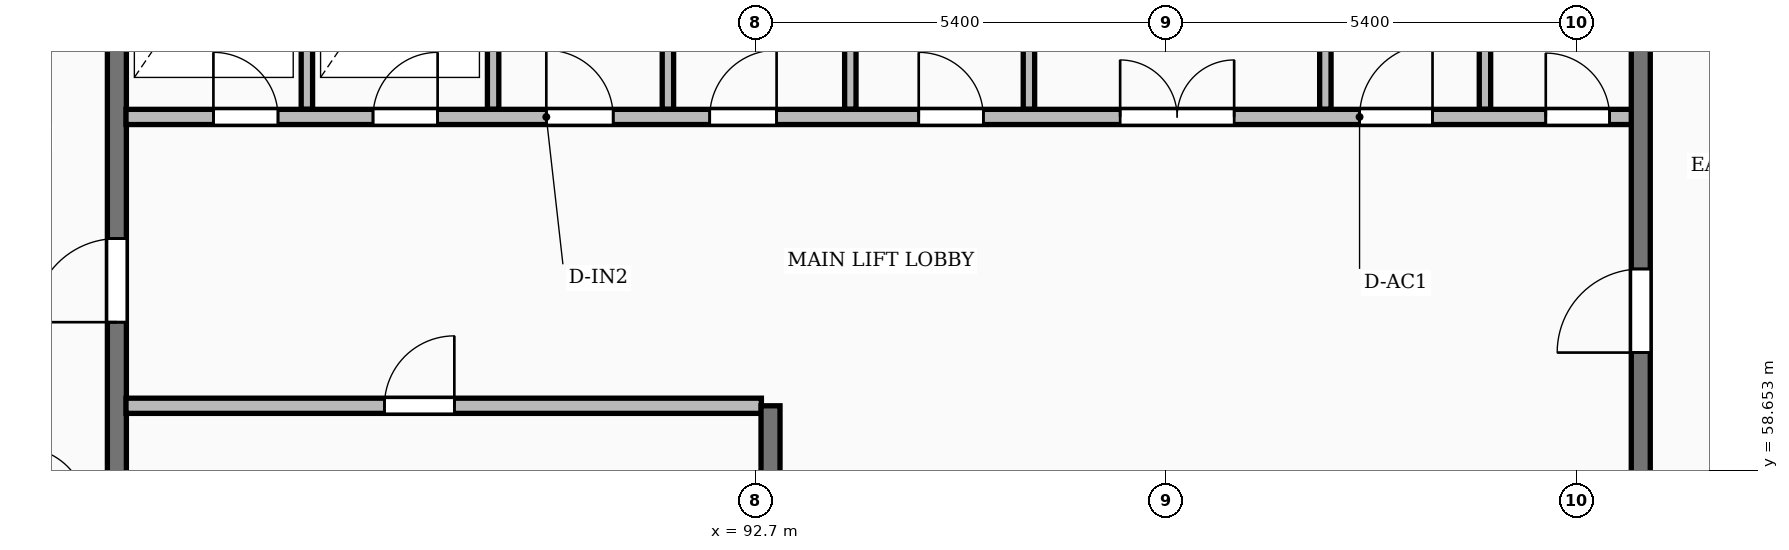
"""IFC4 building model, lengths in metres.
Left out: names, types, materials, properties, quantities, classifications, styles, units other than length and angle.
Written with IfcOpenShell. Run it as: python <this file> out.ifc"""

import sys

from ifc_helpers import new_model, si_unit, direction, frame, frame_2d, origin, place, context, subcontext, project, spatial, rectangle, extrude, element, fill, save


model = new_model("IFC4")
c1 = context("Model", 3, precision=1e-05, world=origin(), true_north=direction((0.0, 1.0)))
c2 = subcontext(c1, "Body", "Model", "MODEL_VIEW")
j1 = project(units=[si_unit("LENGTHUNIT", "METRE"), si_unit("PLANEANGLEUNIT", "RADIAN")], contexts=[c1])
p1 = place(None, origin())
s1 = spatial("IfcSite", under=j1, at=p1, CompositionType="ELEMENT")
p2 = place(p1, origin())
s2 = spatial("IfcBuilding", under=s1, at=p2, CompositionType="ELEMENT")
p3 = place(p2, frame((0.0, 0.0, 162.1)))
s3 = spatial("IfcBuildingStorey", under=s2, at=p3, CompositionType="ELEMENT", Elevation=162.1)
p4 = place(p3, frame((84.3, 55.4, 0.0), z_axis=(0.0, 0.0, 1.0), x_axis=(0.0, 1.0, 0.0)))
e1 = element("IfcWall", 1, at=p4, inside=s3, PredefinedType="SHEAR", context=c2, shape_type="SweptSolid", body=[
    extrude(rectangle(XDim=11.6, YDim=0.25, at=frame_2d((5.8, 0.0))), origin(), (0.0, 0.0, 1.0), 3.25),
])
p5 = place(p4, frame((5.2, 0.0, 0.0)))
e2 = element("IfcOpeningElement", 2, at=p5, cuts=e1, PredefinedType="OPENING", context=c2, shape_type="SweptSolid", body=[
    extrude(rectangle(XDim=1.1, YDim=2.1, at=frame_2d((0.55, 1.05))), frame((0.0, 0.135, 0.0), z_axis=(0.0, -1.0, 0.0), x_axis=(1.0, 0.0, 0.0)), (0.0, 0.0, 1.0), 0.27),
])
p6 = place(p3, frame((84.42, 59.5, 0.0), z_axis=(0.0, 0.0, 1.0), x_axis=(1.0, 0.0, 0.0)))
e3 = element("IfcWall", 3, at=p6, inside=s3, PredefinedType="PARTITIONING", context=c2, shape_type="SweptSolid", body=[
    extrude(rectangle(XDim=8.36, YDim=0.2, at=frame_2d((4.18, 0.0))), origin(), (0.0, 0.0, 1.0), 2.97),
])
p7 = place(p6, frame((3.4, 0.0, 0.0)))
e4 = element("IfcOpeningElement", 4, at=p7, cuts=e3, PredefinedType="OPENING", context=c2, shape_type="SweptSolid", body=[
    extrude(rectangle(XDim=0.92, YDim=2.08, at=frame_2d((0.46, 1.04))), frame((0.0, 0.11, 0.0), z_axis=(0.0, -1.0, 0.0), x_axis=(1.0, 0.0, 0.0)), (0.0, 0.0, 1.0), 0.22),
])
p8 = place(p3, frame((92.9, 55.4, 0.0), z_axis=(0.0, 0.0, 1.0), x_axis=(0.0, 1.0, 0.0)))
e5 = element("IfcWall", 5, at=p8, inside=s3, PredefinedType="SHEAR", context=c2, shape_type="SweptSolid", body=[
    extrude(rectangle(XDim=4.1, YDim=0.25, at=frame_2d((2.05, 0.0))), origin(), (0.0, 0.0, 1.0), 3.25),
])
for number, where, z_axis, x_axis in (
    (6, (86.8, 63.4, 0.0), (0.0, 0.0, 1.0), (0.0, 1.0, 0.0)),
    (7, (89.25, 63.4, 0.0), (0.0, 0.0, 1.0), (0.0, 1.0, 0.0)),
    (8, (91.55, 63.4, 0.0), (0.0, 0.0, 1.0), (0.0, 1.0, 0.0)),
):
    element("IfcWall", number, at=place(p3, frame(where, z_axis=z_axis, x_axis=x_axis)), inside=s3, PredefinedType="PARTITIONING", context=c2, shape_type="SweptSolid", body=[
        extrude(rectangle(XDim=3.6, YDim=0.15, at=frame_2d((1.8, 0.0))), origin(), (0.0, 0.0, 1.0), 2.97),
    ])
p9 = place(p3, frame((93.95, 63.4, 0.0), z_axis=(0.0, 0.0, 1.0), x_axis=(0.0, 1.0, 0.0)))
e9 = element("IfcWall", 9, at=p9, inside=s3, PredefinedType="PARTITIONING", context=c2, shape_type="SweptSolid", body=[
    extrude(rectangle(XDim=3.6, YDim=0.15, at=frame_2d((1.8, 0.0))), origin(), (0.0, 0.0, 1.0), 2.277),
])
for number, where, z_axis, x_axis in (
    (10, (102.3, 63.4, 0.0), (0.0, 0.0, 1.0), (0.0, 1.0, 0.0)),
    (11, (96.3, 63.4, 0.0), (0.0, 0.0, 1.0), (0.0, 1.0, 0.0)),
    (12, (100.2, 63.4, 0.0), (0.0, 0.0, 1.0), (0.0, 1.0, 0.0)),
):
    element("IfcWall", number, at=place(p3, frame(where, z_axis=z_axis, x_axis=x_axis)), inside=s3, PredefinedType="PARTITIONING", context=c2, shape_type="SweptSolid", body=[
        extrude(rectangle(XDim=3.6, YDim=0.15, at=frame_2d((1.8, 0.0))), origin(), (0.0, 0.0, 1.0), 2.97),
    ])
p10 = place(p3, frame((84.42, 63.3, 0.0), z_axis=(0.0, 0.0, 1.0), x_axis=(1.0, 0.0, 0.0)))
e13 = element("IfcWall", 13, at=p10, inside=s3, PredefinedType="PARTITIONING", context=c2, shape_type="SweptSolid", body=[
    extrude(rectangle(XDim=19.83, YDim=0.2, at=frame_2d((9.915, 0.0))), origin(), (0.0, 0.0, 1.0), 2.97),
])
p11 = place(p10, frame((1.15, 0.0, 0.0)))
e14 = element("IfcOpeningElement", 14, at=p11, cuts=e13, PredefinedType="OPENING", context=c2, shape_type="SweptSolid", body=[
    extrude(rectangle(XDim=0.85, YDim=2.05, at=frame_2d((0.425, 1.025))), frame((0.0, 0.11, 0.0), z_axis=(0.0, -1.0, 0.0), x_axis=(1.0, 0.0, 0.0)), (0.0, 0.0, 1.0), 0.22),
])
p12 = place(p10, frame((3.25, 0.0, 0.0)))
e15 = element("IfcOpeningElement", 15, at=p12, cuts=e13, PredefinedType="OPENING", context=c2, shape_type="SweptSolid", body=[
    extrude(rectangle(XDim=0.85, YDim=2.05, at=frame_2d((0.425, 1.025))), frame((0.0, 0.11, 0.0), z_axis=(0.0, -1.0, 0.0), x_axis=(1.0, 0.0, 0.0)), (0.0, 0.0, 1.0), 0.22),
])
p13 = place(p10, frame((13.08, 0.0, 0.0)))
e16 = element("IfcOpeningElement", 16, at=p13, cuts=e13, PredefinedType="OPENING", context=c2, shape_type="SweptSolid", body=[
    extrude(rectangle(XDim=1.5, YDim=2.2, at=frame_2d((0.75, 1.1))), frame((0.0, 0.11, 0.0), z_axis=(0.0, -1.0, 0.0), x_axis=(1.0, 0.0, 0.0)), (0.0, 0.0, 1.0), 0.22),
])
p14 = place(p10, frame((5.53, 0.0, 0.0)))
e17 = element("IfcOpeningElement", 17, at=p14, cuts=e13, PredefinedType="OPENING", context=c2, shape_type="SweptSolid", body=[
    extrude(rectangle(XDim=0.88, YDim=2.06, at=frame_2d((0.44, 1.03))), frame((0.0, 0.11, 0.0), z_axis=(0.0, -1.0, 0.0), x_axis=(1.0, 0.0, 0.0)), (0.0, 0.0, 1.0), 0.22),
])
p15 = place(p10, frame((7.68, 0.0, 0.0)))
e18 = element("IfcOpeningElement", 18, at=p15, cuts=e13, PredefinedType="OPENING", context=c2, shape_type="SweptSolid", body=[
    extrude(rectangle(XDim=0.88, YDim=2.06, at=frame_2d((0.44, 1.03))), frame((0.0, 0.11, 0.0), z_axis=(0.0, -1.0, 0.0), x_axis=(1.0, 0.0, 0.0)), (0.0, 0.0, 1.0), 0.22),
])
p16 = place(p10, frame((10.43, 0.0, 0.0)))
e19 = element("IfcOpeningElement", 19, at=p16, cuts=e13, PredefinedType="OPENING", context=c2, shape_type="SweptSolid", body=[
    extrude(rectangle(XDim=0.85, YDim=2.05, at=frame_2d((0.425, 1.025))), frame((0.0, 0.11, 0.0), z_axis=(0.0, -1.0, 0.0), x_axis=(1.0, 0.0, 0.0)), (0.0, 0.0, 1.0), 0.22),
])
p17 = place(p10, frame((16.23, 0.0, 0.0)))
e20 = element("IfcOpeningElement", 20, at=p17, cuts=e13, PredefinedType="OPENING", context=c2, shape_type="SweptSolid", body=[
    extrude(rectangle(XDim=0.96, YDim=2.1, at=frame_2d((0.48, 1.05))), frame((0.0, 0.11, 0.0), z_axis=(0.0, -1.0, 0.0), x_axis=(1.0, 0.0, 0.0)), (0.0, 0.0, 1.0), 0.22),
])
p18 = place(p10, frame((18.68, 0.0, 0.0)))
e21 = element("IfcOpeningElement", 21, at=p18, cuts=e13, PredefinedType="OPENING", context=c2, shape_type="SweptSolid", body=[
    extrude(rectangle(XDim=0.84, YDim=2.04, at=frame_2d((0.42, 1.02))), frame((0.0, 0.11, 0.0), z_axis=(0.0, -1.0, 0.0), x_axis=(1.0, 0.0, 0.0)), (0.0, 0.0, 1.0), 0.22),
])
p19 = place(p3, frame((104.35, 58.4, 0.0), z_axis=(0.0, 0.0, 1.0), x_axis=(0.0, 1.0, 0.0)))
e22 = element("IfcWall", 22, at=p19, inside=s3, PredefinedType="SHEAR", context=c2, shape_type="SweptSolid", body=[
    extrude(rectangle(XDim=8.6, YDim=0.25, at=frame_2d((4.3, 0.0))), origin(), (0.0, 0.0, 1.0), 3.25),
])
p20 = place(p19, frame((1.8, 0.0, 0.0)))
e23 = element("IfcOpeningElement", 23, at=p20, cuts=e22, PredefinedType="OPENING", context=c2, shape_type="SweptSolid", body=[
    extrude(rectangle(XDim=1.1, YDim=2.1, at=frame_2d((0.55, 1.05))), frame((0.0, 0.135, 0.0), z_axis=(0.0, -1.0, 0.0), x_axis=(1.0, 0.0, 0.0)), (0.0, 0.0, 1.0), 0.27),
])
p21 = place(p5, origin())
e24 = element("IfcDoor", 24, at=p21, inside=s3, OperationType="SINGLE_SWING_LEFT", PredefinedType="DOOR", context=c2, shape_type="SweptSolid", body=[
    extrude(rectangle(XDim=1.1, YDim=2.1, at=frame_2d((0.55, 1.05))), frame((0.0, 0.025, 0.0), z_axis=(0.0, -1.0, 0.0), x_axis=(1.0, 0.0, 0.0)), (0.0, 0.0, 1.0), 0.05),
])
fill(e2, e24)
p22 = place(p7, origin())
e25 = element("IfcDoor", 25, at=p22, inside=s3, OperationType="SINGLE_SWING_RIGHT", PredefinedType="DOOR", context=c2, shape_type="SweptSolid", body=[
    extrude(rectangle(XDim=0.92, YDim=2.08, at=frame_2d((0.46, 1.04))), frame((0.0, 0.025, 0.0), z_axis=(0.0, -1.0, 0.0), x_axis=(1.0, 0.0, 0.0)), (0.0, 0.0, 1.0), 0.05),
])
fill(e4, e25)
p23 = place(p11, origin())
e26 = element("IfcDoor", 26, at=p23, inside=s3, OperationType="SINGLE_SWING_LEFT", PredefinedType="DOOR", context=c2, shape_type="SweptSolid", body=[
    extrude(rectangle(XDim=0.85, YDim=2.05, at=frame_2d((0.425, 1.025))), frame((0.0, 0.025, 0.0), z_axis=(0.0, -1.0, 0.0), x_axis=(1.0, 0.0, 0.0)), (0.0, 0.0, 1.0), 0.05),
])
fill(e14, e26)
p24 = place(p12, origin())
e27 = element("IfcDoor", 27, at=p24, inside=s3, OperationType="SINGLE_SWING_RIGHT", PredefinedType="DOOR", context=c2, shape_type="SweptSolid", body=[
    extrude(rectangle(XDim=0.85, YDim=2.05, at=frame_2d((0.425, 1.025))), frame((0.0, 0.025, 0.0), z_axis=(0.0, -1.0, 0.0), x_axis=(1.0, 0.0, 0.0)), (0.0, 0.0, 1.0), 0.05),
])
fill(e15, e27)
p25 = place(p13, origin())
e28 = element("IfcDoor", 28, at=p25, inside=s3, OperationType="DOUBLE_DOOR_SINGLE_SWING", PredefinedType="DOOR", context=c2, shape_type="SweptSolid", body=[
    extrude(rectangle(XDim=1.5, YDim=2.2, at=frame_2d((0.75, 1.1))), frame((0.0, 0.025, 0.0), z_axis=(0.0, -1.0, 0.0), x_axis=(1.0, 0.0, 0.0)), (0.0, 0.0, 1.0), 0.05),
])
fill(e16, e28)
p26 = place(p14, origin())
e29 = element("IfcDoor", 29, at=p26, inside=s3, OperationType="SINGLE_SWING_LEFT", PredefinedType="DOOR", context=c2, shape_type="SweptSolid", body=[
    extrude(rectangle(XDim=0.88, YDim=2.06, at=frame_2d((0.44, 1.03))), frame((0.0, 0.025, 0.0), z_axis=(0.0, -1.0, 0.0), x_axis=(1.0, 0.0, 0.0)), (0.0, 0.0, 1.0), 0.05),
])
fill(e17, e29)
p27 = place(p15, origin())
e30 = element("IfcDoor", 30, at=p27, inside=s3, OperationType="SINGLE_SWING_RIGHT", PredefinedType="DOOR", context=c2, shape_type="SweptSolid", body=[
    extrude(rectangle(XDim=0.88, YDim=2.06, at=frame_2d((0.44, 1.03))), frame((0.0, 0.025, 0.0), z_axis=(0.0, -1.0, 0.0), x_axis=(1.0, 0.0, 0.0)), (0.0, 0.0, 1.0), 0.05),
])
fill(e18, e30)
p28 = place(p16, origin())
e31 = element("IfcDoor", 31, at=p28, inside=s3, OperationType="SINGLE_SWING_LEFT", PredefinedType="DOOR", context=c2, shape_type="SweptSolid", body=[
    extrude(rectangle(XDim=0.85, YDim=2.05, at=frame_2d((0.425, 1.025))), frame((0.0, 0.025, 0.0), z_axis=(0.0, -1.0, 0.0), x_axis=(1.0, 0.0, 0.0)), (0.0, 0.0, 1.0), 0.05),
])
fill(e19, e31)
p29 = place(p17, origin())
e32 = element("IfcDoor", 32, at=p29, inside=s3, OperationType="SINGLE_SWING_RIGHT", PredefinedType="DOOR", context=c2, shape_type="SweptSolid", body=[
    extrude(rectangle(XDim=0.96, YDim=2.1, at=frame_2d((0.48, 1.05))), frame((0.0, 0.025, 0.0), z_axis=(0.0, -1.0, 0.0), x_axis=(1.0, 0.0, 0.0)), (0.0, 0.0, 1.0), 0.05),
])
fill(e20, e32)
p30 = place(p18, origin())
e33 = element("IfcDoor", 33, at=p30, inside=s3, OperationType="SINGLE_SWING_LEFT", PredefinedType="DOOR", context=c2, shape_type="SweptSolid", body=[
    extrude(rectangle(XDim=0.84, YDim=2.04, at=frame_2d((0.42, 1.02))), frame((0.0, 0.025, 0.0), z_axis=(0.0, -1.0, 0.0), x_axis=(1.0, 0.0, 0.0)), (0.0, 0.0, 1.0), 0.05),
])
fill(e21, e33)
p31 = place(p20, origin())
e34 = element("IfcDoor", 34, at=p31, inside=s3, OperationType="SINGLE_SWING_LEFT", PredefinedType="DOOR", context=c2, shape_type="SweptSolid", body=[
    extrude(rectangle(XDim=1.1, YDim=2.1, at=frame_2d((0.55, 1.05))), frame((0.0, 0.025, 0.0), z_axis=(0.0, -1.0, 0.0), x_axis=(1.0, 0.0, 0.0)), (0.0, 0.0, 1.0), 0.05),
])
fill(e23, e34)
save(model, sys.argv[1])
